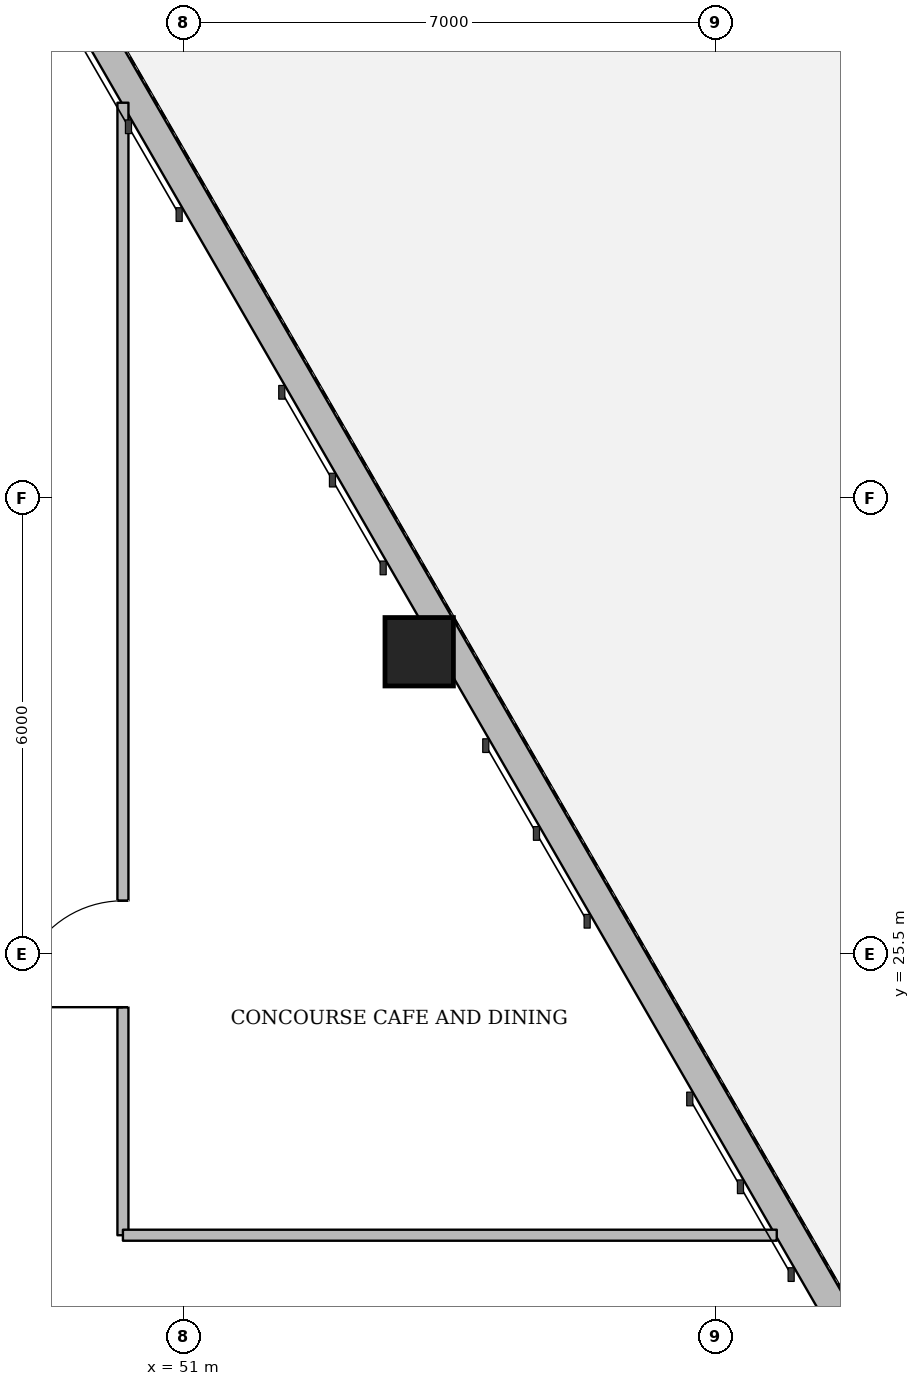
"""IFC4 building model, lengths in metres.
Left out: names, types, materials, properties, quantities, classifications, styles, units other than length and angle.
Written with IfcOpenShell. Run it as: python <this file> out.ifc"""

import sys

from ifc_helpers import new_model, si_unit, direction, frame, frame_2d, origin, origin_2d, place, context, subcontext, project, spatial, rectangle, hollow_rectangle, extrude, element, fill, save


model = new_model("IFC4")
c1 = context("Model", 3, precision=1e-05, world=origin(), true_north=direction((0.0, 1.0)))
c2 = subcontext(c1, "Body", "Model", "MODEL_VIEW")
j1 = project(units=[si_unit("LENGTHUNIT", "METRE"), si_unit("PLANEANGLEUNIT", "RADIAN")], contexts=[c1])
p1 = place(None, origin())
s1 = spatial("IfcSite", under=j1, at=p1, CompositionType="ELEMENT")
p2 = place(p1, origin())
s2 = spatial("IfcBuilding", under=s1, at=p2, CompositionType="ELEMENT")
p3 = place(p2, origin())
s3 = spatial("IfcBuildingStorey", under=s2, at=p3, CompositionType="ELEMENT", Elevation=0.0)
p4 = place(p3, frame((54.098, 29.476, 0.0), z_axis=(0.0, 0.0, 1.0), x_axis=(1.0, 0.0, 0.0)))
e1 = element("IfcColumn", 1, at=p4, inside=s3, PredefinedType="COLUMN", context=c2, shape_type="SweptSolid", body=[
    extrude(hollow_rectangle(XDim=0.9, YDim=0.9, WallThickness=0.038, at=origin_2d()), origin(), (0.0, 0.0, 1.0), 5.74),
])
p5 = place(p3, frame((46.242, 43.904, 0.0), z_axis=(0.0, 0.0, 1.0), x_axis=(0.500000109808, -0.866025340387, 0.0)))
e2 = element("IfcWall", 2, at=p5, inside=s3, PredefinedType="STANDARD", context=c2, shape_type="SweptSolid", body=[
    extrude(rectangle(XDim=33.16, YDim=0.38, at=frame_2d((16.58, 0.0))), origin(), (0.0, 0.0, 1.0), 3.43),
])
p6 = place(p5, frame((27.053, 0.0, 0.0)))
e3 = element("IfcOpeningElement", 3, at=p6, cuts=e2, PredefinedType="OPENING", context=c2, shape_type="SweptSolid", body=[
    extrude(rectangle(XDim=1.8, YDim=2.25, at=frame_2d((0.9, 1.125))), frame((0.0, 0.2, 0.0), z_axis=(0.0, -1.0, 0.0), x_axis=(1.0, 0.0, 0.0)), (0.0, 0.0, 1.0), 0.4),
])
p7 = place(p5, frame((1.861, 0.0, 0.55)))
e4 = element("IfcOpeningElement", 4, at=p7, cuts=e2, PredefinedType="OPENING", context=c2, shape_type="SweptSolid", body=[
    extrude(rectangle(XDim=2.6, YDim=2.55, at=frame_2d((1.3, 1.275))), frame((0.0, 0.2, 0.0), z_axis=(0.0, -1.0, 0.0), x_axis=(1.0, 0.0, 0.0)), (0.0, 0.0, 1.0), 0.4),
])
p8 = place(p3, frame((50.2, 21.8, 0.0), z_axis=(0.0, 0.0, 1.0), x_axis=(0.0, 1.0, 0.0)))
e5 = element("IfcWall", 5, at=p8, inside=s3, PredefinedType="PARTITIONING", context=c2, shape_type="SweptSolid", body=[
    extrude(rectangle(XDim=14.899, YDim=0.145, at=frame_2d((7.449, 0.0))), origin(), (0.0, 0.0, 1.0), 3.435),
])
p9 = place(p8, frame((3.0, 0.0, 0.0)))
e6 = element("IfcOpeningElement", 6, at=p9, cuts=e5, PredefinedType="OPENING", context=c2, shape_type="SweptSolid", body=[
    extrude(rectangle(XDim=1.4, YDim=2.2, at=frame_2d((0.7, 1.1))), frame((0.0, 0.083, 0.0), z_axis=(0.0, -1.0, 0.0), x_axis=(1.0, 0.0, 0.0)), (0.0, 0.0, 1.0), 0.165),
])
p10 = place(p3, frame((50.2, 21.8, 0.0), z_axis=(0.0, 0.0, 1.0), x_axis=(1.0, 0.0, 0.0)))
e7 = element("IfcWall", 7, at=p10, inside=s3, PredefinedType="PARTITIONING", context=c2, shape_type="SweptSolid", body=[
    extrude(rectangle(XDim=8.602, YDim=0.145, at=frame_2d((4.301, 0.0))), origin(), (0.0, 0.0, 1.0), 5.74),
])
p11 = place(p9, origin())
e8 = element("IfcDoor", 8, at=p11, inside=s3, OperationType="SINGLE_SWING_LEFT", PredefinedType="DOOR", context=c2, shape_type="SweptSolid", body=[
    extrude(rectangle(XDim=1.4, YDim=2.2, at=frame_2d((0.7, 1.1))), frame((0.0, 0.025, 0.0), z_axis=(0.0, -1.0, 0.0), x_axis=(1.0, 0.0, 0.0)), (0.0, 0.0, 1.0), 0.05),
])
fill(e6, e8)
save(model, sys.argv[1])
